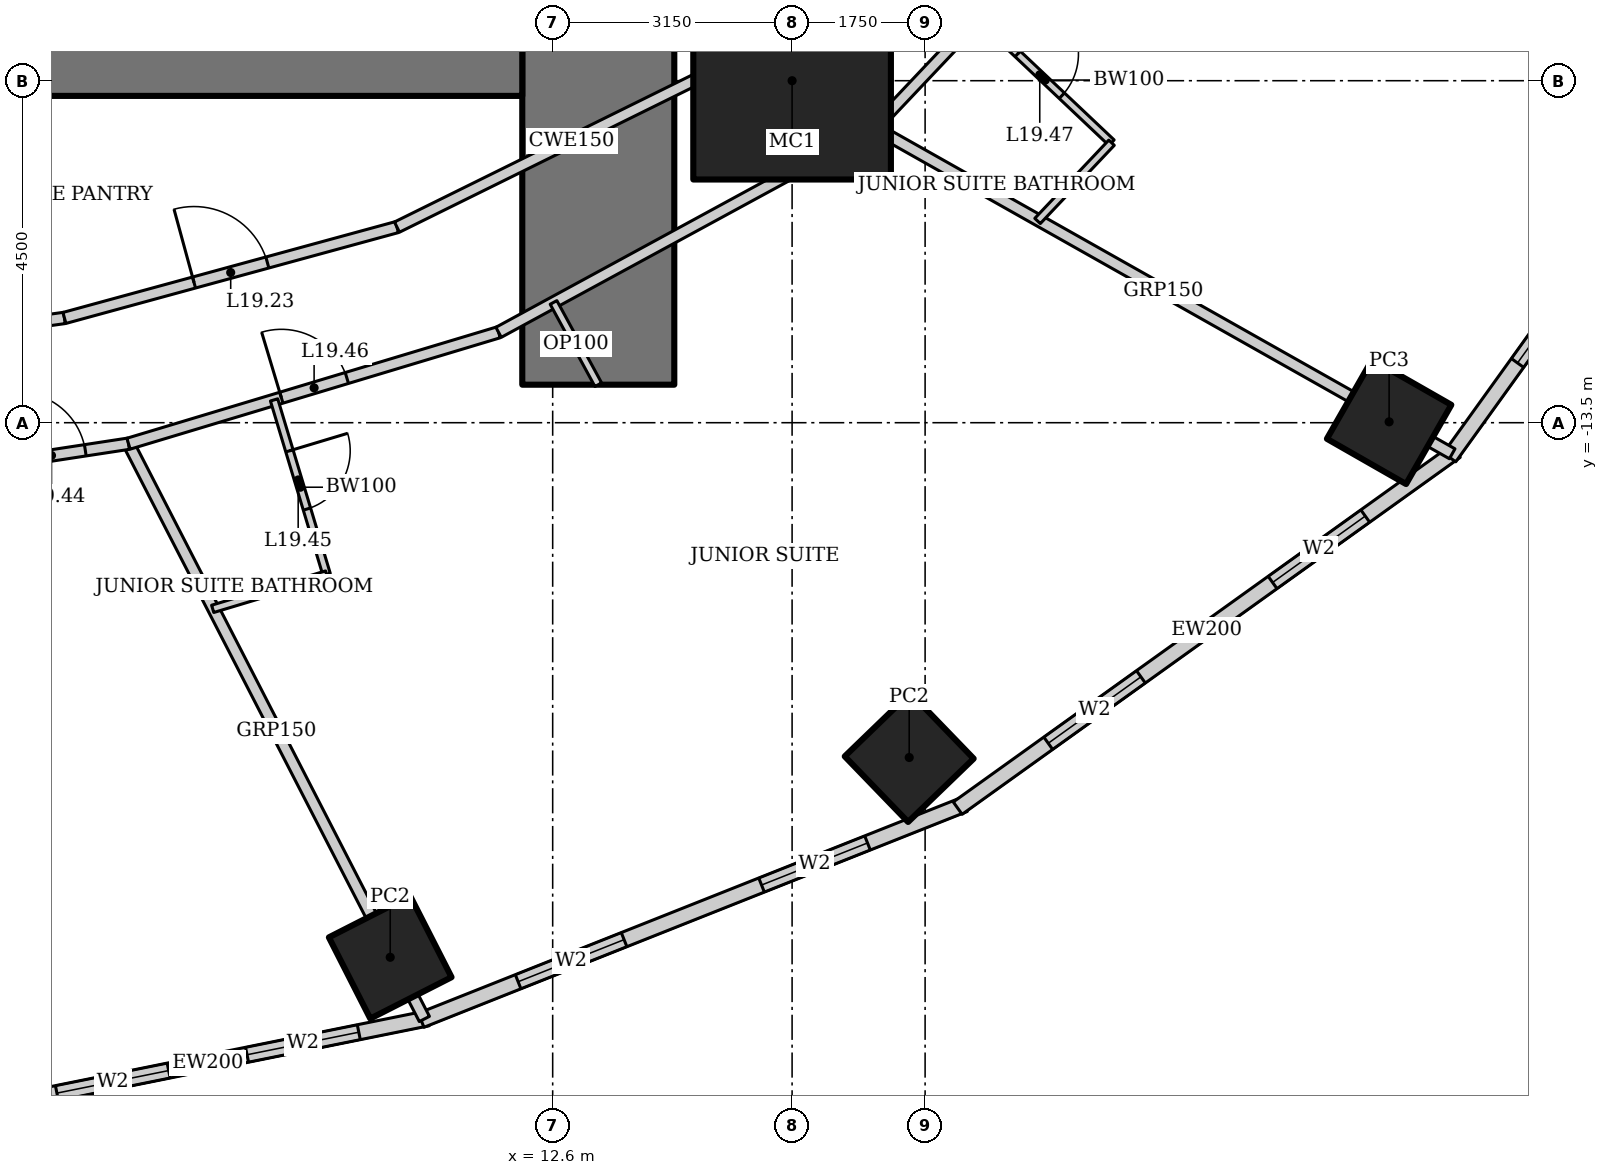
"""IFC4 building model, lengths in metres.
Left out: names, types, materials, properties, quantities, classifications, styles, units other than length and angle.
Written with IfcOpenShell. Run it as: python <this file> out.ifc"""

import sys

from ifc_helpers import new_model, si_unit, direction, frame, frame_2d, origin, origin_2d, place, context, subcontext, project, spatial, rectangle, hollow_rectangle, extrude, element, fill, save


model = new_model("IFC4")
c1 = context("Model", 3, precision=1e-05, world=origin(), true_north=direction((0.0, 1.0)))
c2 = subcontext(c1, "Body", "Model", "MODEL_VIEW")
j1 = project(units=[si_unit("LENGTHUNIT", "METRE"), si_unit("PLANEANGLEUNIT", "RADIAN")], contexts=[c1])
p1 = place(None, origin())
s1 = spatial("IfcSite", under=j1, at=p1, CompositionType="ELEMENT")
p2 = place(p1, origin())
s2 = spatial("IfcBuilding", under=s1, at=p2, CompositionType="ELEMENT")
p3 = place(p2, frame((0.0, 0.0, 83.8)))
s3 = spatial("IfcBuildingStorey", under=s2, at=p3, CompositionType="ELEMENT", Elevation=83.8)
p4 = place(p3, frame((15.75, -9.0, 0.0), z_axis=(0.0, 0.0, 1.0), x_axis=(1.0, 0.0, 0.0)))
e1 = element("IfcColumn", 1, at=p4, inside=s3, PredefinedType="COLUMN", context=c2, shape_type="SweptSolid", body=[
    extrude(hollow_rectangle(XDim=2.6, YDim=2.6, WallThickness=0.13, at=origin_2d()), origin(), (0.0, 0.0, 1.0), 3.6),
])
for number, where, z_axis, x_axis in (
    (2, (10.463, -20.534, 0.0), (0.0, 0.0, 1.0), (0.891, 0.454, 0.0)),
    (3, (17.291, -17.905, 0.0), (0.0, 0.0, 1.0), (0.719, 0.695, 0.0)),
):
    element("IfcColumn", number, at=place(p3, frame(where, z_axis=z_axis, x_axis=x_axis)), inside=s3, PredefinedType="COLUMN", context=c2, shape_type="SweptSolid", body=[
        extrude(hollow_rectangle(XDim=1.2, YDim=1.2, WallThickness=0.1, at=origin_2d()), origin(), (0.0, 0.0, 1.0), 3.6),
    ])
p5 = place(p3, frame((23.605, -13.489, 0.0), z_axis=(0.0, 0.0, 1.0), x_axis=(0.496139221777, 0.86824298017, 0.0)))
e4 = element("IfcColumn", 4, at=p5, inside=s3, PredefinedType="COLUMN", context=c2, shape_type="SweptSolid", body=[
    extrude(hollow_rectangle(XDim=1.2, YDim=1.2, WallThickness=0.12, at=origin_2d()), origin(), (0.0, 0.0, 1.0), 3.6),
])
p6 = place(p3, frame((13.2, -13.0, 0.0), z_axis=(0.0, 0.0, 1.0), x_axis=(0.0, 1.0, 0.0)))
e5 = element("IfcWall", 5, at=p6, inside=s3, PredefinedType="SHEAR", context=c2, shape_type="SweptSolid", body=[
    extrude(rectangle(XDim=26.0, YDim=2.0, at=frame_2d((13.0, 0.0))), origin(), (0.0, 0.0, 1.0), 3.6),
])
p7 = place(p6, frame((12.1, 0.0, 0.0)))
e6 = element("IfcOpeningElement", 6, at=p7, cuts=e5, PredefinedType="OPENING", context=c2, shape_type="SweptSolid", body=[
    extrude(rectangle(XDim=1.8, YDim=2.1, at=frame_2d((0.9, 1.05))), frame((0.0, 1.01, 0.0), z_axis=(0.0, -1.0, 0.0), x_axis=(1.0, 0.0, 0.0)), (0.0, 0.0, 1.0), 2.02),
])
p8 = place(p3, frame((-12.2, -8.0, 0.0), z_axis=(0.0, 0.0, 1.0), x_axis=(1.0, 0.0, 0.0)))
e7 = element("IfcWall", 7, at=p8, inside=s3, PredefinedType="SHEAR", context=c2, shape_type="SweptSolid", body=[
    extrude(rectangle(XDim=24.4, YDim=2.4, at=frame_2d((12.2, 0.0))), origin(), (0.0, 0.0, 1.0), 3.6),
])
p9 = place(p3, frame((5.17, -22.504, 0.0), z_axis=(0.0, 0.0, 1.0), x_axis=(0.980251657452, 0.197754110105, 0.0)))
e8 = element("IfcWall", 8, at=p9, inside=s3, PredefinedType="SOLIDWALL", context=c2, shape_type="SweptSolid", body=[
    extrude(rectangle(XDim=5.904, YDim=0.2, at=frame_2d((2.952, 0.0))), origin(), (0.0, 0.0, 1.0), 3.45),
])
p10 = place(p9, frame((0.926, 0.0, 0.5)))
e9 = element("IfcOpeningElement", 9, at=p10, cuts=e8, PredefinedType="OPENING", context=c2, shape_type="SweptSolid", body=[
    extrude(rectangle(XDim=1.5, YDim=2.2, at=frame_2d((0.75, 1.1))), frame((0.0, 0.11, 0.0), z_axis=(0.0, -1.0, 0.0), x_axis=(1.0, 0.0, 0.0)), (0.0, 0.0, 1.0), 0.22),
])
p11 = place(p9, frame((3.478, 0.0, 0.5)))
e10 = element("IfcOpeningElement", 10, at=p11, cuts=e8, PredefinedType="OPENING", context=c2, shape_type="SweptSolid", body=[
    extrude(rectangle(XDim=1.5, YDim=2.2, at=frame_2d((0.75, 1.1))), frame((0.0, 0.11, 0.0), z_axis=(0.0, -1.0, 0.0), x_axis=(1.0, 0.0, 0.0)), (0.0, 0.0, 1.0), 0.22),
])
p12 = place(p3, frame((10.869, -21.363, 0.0), z_axis=(0.0, 0.0, 1.0), x_axis=(0.929358351251, 0.369178892895, 0.0)))
e11 = element("IfcWall", 11, at=p12, inside=s3, PredefinedType="SOLIDWALL", context=c2, shape_type="SweptSolid", body=[
    extrude(rectangle(XDim=7.692, YDim=0.2, at=frame_2d((3.846, 0.0))), origin(), (0.0, 0.0, 1.0), 3.45),
])
p13 = place(p12, frame((1.373, 0.0, 0.5)))
e12 = element("IfcOpeningElement", 12, at=p13, cuts=e11, PredefinedType="OPENING", context=c2, shape_type="SweptSolid", body=[
    extrude(rectangle(XDim=1.5, YDim=2.2, at=frame_2d((0.75, 1.1))), frame((0.0, 0.11, 0.0), z_axis=(0.0, -1.0, 0.0), x_axis=(1.0, 0.0, 0.0)), (0.0, 0.0, 1.0), 0.22),
])
p14 = place(p12, frame((4.819, 0.0, 0.5)))
e13 = element("IfcOpeningElement", 13, at=p14, cuts=e11, PredefinedType="OPENING", context=c2, shape_type="SweptSolid", body=[
    extrude(rectangle(XDim=1.5, YDim=2.2, at=frame_2d((0.75, 1.1))), frame((0.0, 0.11, 0.0), z_axis=(0.0, -1.0, 0.0), x_axis=(1.0, 0.0, 0.0)), (0.0, 0.0, 1.0), 0.22),
])
p15 = place(p3, frame((17.929, -18.572, 0.0), z_axis=(0.0, 0.0, 1.0), x_axis=(0.812791321576, 0.582554948112, 0.0)))
e14 = element("IfcWall", 14, at=p15, inside=s3, PredefinedType="SOLIDWALL", context=c2, shape_type="SweptSolid", body=[
    extrude(rectangle(XDim=8.063, YDim=0.2, at=frame_2d((4.032, 0.0))), origin(), (0.0, 0.0, 1.0), 3.45),
])
p16 = place(p15, frame((1.466, 0.0, 0.5)))
e15 = element("IfcOpeningElement", 15, at=p16, cuts=e14, PredefinedType="OPENING", context=c2, shape_type="SweptSolid", body=[
    extrude(rectangle(XDim=1.5, YDim=2.2, at=frame_2d((0.75, 1.1))), frame((0.0, 0.11, 0.0), z_axis=(0.0, -1.0, 0.0), x_axis=(1.0, 0.0, 0.0)), (0.0, 0.0, 1.0), 0.22),
])
p17 = place(p15, frame((5.097, 0.0, 0.5)))
e16 = element("IfcOpeningElement", 16, at=p17, cuts=e14, PredefinedType="OPENING", context=c2, shape_type="SweptSolid", body=[
    extrude(rectangle(XDim=1.5, YDim=2.2, at=frame_2d((0.75, 1.1))), frame((0.0, 0.11, 0.0), z_axis=(0.0, -1.0, 0.0), x_axis=(1.0, 0.0, 0.0)), (0.0, 0.0, 1.0), 0.22),
])
p18 = place(p3, frame((24.4, -13.957, 0.0), z_axis=(0.0, 0.0, 1.0), x_axis=(0.583937613703, 0.811798536155, 0.0)))
e17 = element("IfcWall", 17, at=p18, inside=s3, PredefinedType="SOLIDWALL", context=c2, shape_type="SweptSolid", body=[
    extrude(rectangle(XDim=8.323, YDim=0.2, at=frame_2d((4.162, 0.0))), origin(), (0.0, 0.0, 1.0), 3.45),
])
p19 = place(p18, frame((1.531, 0.0, 0.5)))
e18 = element("IfcOpeningElement", 18, at=p19, cuts=e17, PredefinedType="OPENING", context=c2, shape_type="SweptSolid", body=[
    extrude(rectangle(XDim=1.5, YDim=2.2, at=frame_2d((0.75, 1.1))), frame((0.0, 0.11, 0.0), z_axis=(0.0, -1.0, 0.0), x_axis=(1.0, 0.0, 0.0)), (0.0, 0.0, 1.0), 0.22),
])
p20 = place(p18, frame((5.292, 0.0, 0.5)))
e19 = element("IfcOpeningElement", 19, at=p20, cuts=e17, PredefinedType="OPENING", context=c2, shape_type="SweptSolid", body=[
    extrude(rectangle(XDim=1.5, YDim=2.2, at=frame_2d((0.75, 1.1))), frame((0.0, 0.11, 0.0), z_axis=(0.0, -1.0, 0.0), x_axis=(1.0, 0.0, 0.0)), (0.0, 0.0, 1.0), 0.22),
])
p21 = place(p3, frame((10.912, -21.346, 0.0), z_axis=(0.0, 0.0, 1.0), x_axis=(-0.457327273085, 0.889298468059, 0.0)))
e20 = element("IfcWall", 20, at=p21, inside=s3, PredefinedType="PARTITIONING", context=c2, shape_type="SweptSolid", body=[
    extrude(rectangle(XDim=8.511, YDim=0.15, at=frame_2d((4.256, 0.0))), origin(), (0.0, 0.0, 1.0), 2.528),
])
p22 = place(p3, frame((24.435, -13.909, 0.0), z_axis=(0.0, 0.0, 1.0), x_axis=(-0.87090601027, 0.491449612143, 0.0)))
e21 = element("IfcWall", 21, at=p22, inside=s3, PredefinedType="PARTITIONING", context=c2, shape_type="SweptSolid", body=[
    extrude(rectangle(XDim=8.726, YDim=0.15, at=frame_2d((4.363, 0.0))), origin(), (0.0, 0.0, 1.0), 2.693),
])
p23 = place(p3, frame((3.311, -14.342, 0.0), z_axis=(0.0, 0.0, 1.0), x_axis=(0.988564270062, 0.150800145746, 0.0)))
e22 = element("IfcWall", 22, at=p23, inside=s3, PredefinedType="PARTITIONING", context=c2, shape_type="SweptSolid", body=[
    extrude(rectangle(XDim=3.751, YDim=0.15, at=frame_2d((1.875, 0.0))), origin(), (0.0, 0.0, 1.0), 3.45),
])
p24 = place(p23, frame((2.276, 0.0, 0.0)))
e23 = element("IfcOpeningElement", 23, at=p24, cuts=e22, PredefinedType="OPENING", context=c2, shape_type="SweptSolid", body=[
    extrude(rectangle(XDim=0.9, YDim=2.1, at=frame_2d((0.45, 1.05))), frame((0.0, 0.085, 0.0), z_axis=(0.0, -1.0, 0.0), x_axis=(1.0, 0.0, 0.0)), (0.0, 0.0, 1.0), 0.17),
])
p25 = place(p3, frame((7.019, -13.776, 0.0), z_axis=(0.0, 0.0, 1.0), x_axis=(0.957564241242, 0.288219922793, 0.0)))
e24 = element("IfcWall", 24, at=p25, inside=s3, PredefinedType="PARTITIONING", context=c2, shape_type="SweptSolid", body=[
    extrude(rectangle(XDim=5.085, YDim=0.15, at=frame_2d((2.542, 0.0))), origin(), (0.0, 0.0, 1.0), 3.45),
])
p26 = place(p25, frame((2.1, 0.0, 0.0)))
e25 = element("IfcOpeningElement", 25, at=p26, cuts=e24, PredefinedType="OPENING", context=c2, shape_type="SweptSolid", body=[
    extrude(rectangle(XDim=0.9, YDim=2.1, at=frame_2d((0.45, 1.05))), frame((0.0, 0.085, 0.0), z_axis=(0.0, -1.0, 0.0), x_axis=(1.0, 0.0, 0.0)), (0.0, 0.0, 1.0), 0.17),
])
p27 = place(p3, frame((11.888, -12.311, 0.0), z_axis=(0.0, 0.0, 1.0), x_axis=(0.878450059298, 0.477834169267, 0.0)))
e26 = element("IfcWall", 26, at=p27, inside=s3, PredefinedType="PARTITIONING", context=c2, shape_type="SweptSolid", body=[
    extrude(rectangle(XDim=5.631, YDim=0.15, at=frame_2d((2.815, 0.0))), origin(), (0.0, 0.0, 1.0), 3.45),
])
p28 = place(p3, frame((16.835, -9.62, 0.0), z_axis=(0.0, 0.0, 1.0), x_axis=(0.687062608696, 0.726598218916, 0.0)))
e27 = element("IfcWall", 27, at=p28, inside=s3, PredefinedType="PARTITIONING", context=c2, shape_type="SweptSolid", body=[
    extrude(rectangle(XDim=6.039, YDim=0.15, at=frame_2d((3.02, 0.0))), origin(), (0.0, 0.0, 1.0), 3.45),
])
p29 = place(p3, frame((2.903, -12.574, 0.0), z_axis=(0.0, 0.0, 1.0), x_axis=(0.990563451353, 0.137054911782, 0.0)))
e28 = element("IfcWall", 28, at=p29, inside=s3, PredefinedType="PARTITIONING", context=c2, shape_type="SweptSolid", body=[
    extrude(rectangle(XDim=3.304, YDim=0.15, at=frame_2d((1.652, 0.0))), origin(), (0.0, 0.0, 1.0), 3.45),
])
p30 = place(p3, frame((6.176, -12.122, 0.0), z_axis=(0.0, 0.0, 1.0), x_axis=(0.964644466646, 0.263554648923, 0.0)))
e29 = element("IfcWall", 29, at=p30, inside=s3, PredefinedType="PARTITIONING", context=c2, shape_type="SweptSolid", body=[
    extrude(rectangle(XDim=4.535, YDim=0.15, at=frame_2d((2.268, 0.0))), origin(), (0.0, 0.0, 1.0), 3.45),
])
p31 = place(p30, frame((1.768, 0.0, 0.0)))
e30 = element("IfcOpeningElement", 30, at=p31, cuts=e29, PredefinedType="OPENING", context=c2, shape_type="SweptSolid", body=[
    extrude(rectangle(XDim=1.0, YDim=2.1, at=frame_2d((0.5, 1.05))), frame((0.0, 0.085, 0.0), z_axis=(0.0, -1.0, 0.0), x_axis=(1.0, 0.0, 0.0)), (0.0, 0.0, 1.0), 0.17),
])
p32 = place(p3, frame((10.551, -10.926, 0.0), z_axis=(0.0, 0.0, 1.0), x_axis=(0.89656943448, 0.442903205177, 0.0)))
e31 = element("IfcWall", 31, at=p32, inside=s3, PredefinedType="PARTITIONING", context=c2, shape_type="SweptSolid", body=[
    extrude(rectangle(XDim=5.126, YDim=0.15, at=frame_2d((2.563, 0.0))), origin(), (0.0, 0.0, 1.0), 3.45),
])
p33 = place(p3, frame((15.147, -8.656, 0.0), z_axis=(0.0, 0.0, 1.0), x_axis=(0.720837261072, 0.693104352209, 0.0)))
e32 = element("IfcWall", 32, at=p33, inside=s3, PredefinedType="PARTITIONING", context=c2, shape_type="SweptSolid", body=[
    extrude(rectangle(XDim=5.59, YDim=0.15, at=frame_2d((2.795, 0.0))), origin(), (0.0, 0.0, 1.0), 3.45),
])
p34 = place(p33, frame((2.295, 0.0, 0.0)))
e33 = element("IfcOpeningElement", 33, at=p34, cuts=e32, PredefinedType="OPENING", context=c2, shape_type="SweptSolid", body=[
    extrude(rectangle(XDim=1.0, YDim=2.1, at=frame_2d((0.5, 1.05))), frame((0.0, 0.085, 0.0), z_axis=(0.0, -1.0, 0.0), x_axis=(1.0, 0.0, 0.0)), (0.0, 0.0, 1.0), 0.17),
])
p35 = place(p3, frame((8.935, -13.2, 0.0), z_axis=(0.0, 0.0, 1.0), x_axis=(0.288197066254, -0.957571120598, 0.0)))
e34 = element("IfcWall", 34, at=p35, inside=s3, PredefinedType="PARTITIONING", context=c2, shape_type="SweptSolid", body=[
    extrude(rectangle(XDim=2.4, YDim=0.1, at=frame_2d((1.2, 0.0))), origin(), (0.0, 0.0, 1.0), 3.45),
])
p36 = place(p35, frame((0.7, 0.0, 0.0)))
e35 = element("IfcOpeningElement", 35, at=p36, cuts=e34, PredefinedType="OPENING", context=c2, shape_type="SweptSolid", body=[
    extrude(rectangle(XDim=0.8, YDim=2.1, at=frame_2d((0.4, 1.05))), frame((0.0, 0.06, 0.0), z_axis=(0.0, -1.0, 0.0), x_axis=(1.0, 0.0, 0.0)), (0.0, 0.0, 1.0), 0.12),
])
p37 = place(p3, frame((9.626, -15.498, 0.0), z_axis=(0.0, 0.0, 1.0), x_axis=(-0.957551231109, -0.288263143328, 0.0)))
e36 = element("IfcWall", 36, at=p37, inside=s3, PredefinedType="PARTITIONING", context=c2, shape_type="SweptSolid", body=[
    extrude(rectangle(XDim=1.566, YDim=0.1, at=frame_2d((0.783, 0.0))), origin(), (0.0, 0.0, 1.0), 3.45),
])
p38 = place(p3, frame((18.209, -8.167, 0.0), z_axis=(0.0, 0.0, 1.0), x_axis=(0.726567238928, -0.687095369885, 0.0)))
e37 = element("IfcWall", 37, at=p38, inside=s3, PredefinedType="PARTITIONING", context=c2, shape_type="SweptSolid", body=[
    extrude(rectangle(XDim=2.4, YDim=0.1, at=frame_2d((1.2, 0.0))), origin(), (0.0, 0.0, 1.0), 3.45),
])
p39 = place(p38, frame((0.7, 0.0, 0.0)))
e38 = element("IfcOpeningElement", 38, at=p39, cuts=e37, PredefinedType="OPENING", context=c2, shape_type="SweptSolid", body=[
    extrude(rectangle(XDim=0.8, YDim=2.1, at=frame_2d((0.4, 1.05))), frame((0.0, 0.06, 0.0), z_axis=(0.0, -1.0, 0.0), x_axis=(1.0, 0.0, 0.0)), (0.0, 0.0, 1.0), 0.12),
])
p40 = place(p3, frame((19.953, -9.816, 0.0), z_axis=(0.0, 0.0, 1.0), x_axis=(-0.687017997787, -0.726640399866, 0.0)))
e39 = element("IfcWall", 39, at=p40, inside=s3, PredefinedType="PARTITIONING", context=c2, shape_type="SweptSolid", body=[
    extrude(rectangle(XDim=1.417, YDim=0.1, at=frame_2d((0.708, 0.0))), origin(), (0.0, 0.0, 1.0), 3.45),
])
p41 = place(p3, frame((13.2, -13.0, 0.0), z_axis=(0.0, 0.0, 1.0), x_axis=(-0.477852414256, 0.878440134665, 0.0)))
e40 = element("IfcWall", 40, at=p41, inside=s3, PredefinedType="PARTITIONING", context=c2, shape_type="SweptSolid", body=[
    extrude(rectangle(XDim=1.232, YDim=0.1, at=frame_2d((0.616, 0.0))), origin(), (0.0, 0.0, 1.0), 3.45),
])
p42 = place(p10, origin())
e41 = element("IfcWindow", 41, at=p42, inside=s3, PartitioningType="SINGLE_PANEL", PredefinedType="WINDOW", context=c2, shape_type="SweptSolid", body=[
    extrude(rectangle(XDim=1.5, YDim=2.2, at=frame_2d((0.75, 1.1))), frame((0.0, 0.03, 0.0), z_axis=(0.0, -1.0, 0.0), x_axis=(1.0, 0.0, 0.0)), (0.0, 0.0, 1.0), 0.06),
])
fill(e9, e41)
p43 = place(p11, origin())
e42 = element("IfcWindow", 42, at=p43, inside=s3, PartitioningType="SINGLE_PANEL", PredefinedType="WINDOW", context=c2, shape_type="SweptSolid", body=[
    extrude(rectangle(XDim=1.5, YDim=2.2, at=frame_2d((0.75, 1.1))), frame((0.0, 0.03, 0.0), z_axis=(0.0, -1.0, 0.0), x_axis=(1.0, 0.0, 0.0)), (0.0, 0.0, 1.0), 0.06),
])
fill(e10, e42)
p44 = place(p13, origin())
e43 = element("IfcWindow", 43, at=p44, inside=s3, PartitioningType="SINGLE_PANEL", PredefinedType="WINDOW", context=c2, shape_type="SweptSolid", body=[
    extrude(rectangle(XDim=1.5, YDim=2.2, at=frame_2d((0.75, 1.1))), frame((0.0, 0.03, 0.0), z_axis=(0.0, -1.0, 0.0), x_axis=(1.0, 0.0, 0.0)), (0.0, 0.0, 1.0), 0.06),
])
fill(e12, e43)
p45 = place(p14, origin())
e44 = element("IfcWindow", 44, at=p45, inside=s3, PartitioningType="SINGLE_PANEL", PredefinedType="WINDOW", context=c2, shape_type="SweptSolid", body=[
    extrude(rectangle(XDim=1.5, YDim=2.2, at=frame_2d((0.75, 1.1))), frame((0.0, 0.03, 0.0), z_axis=(0.0, -1.0, 0.0), x_axis=(1.0, 0.0, 0.0)), (0.0, 0.0, 1.0), 0.06),
])
fill(e13, e44)
p46 = place(p16, origin())
e45 = element("IfcWindow", 45, at=p46, inside=s3, PartitioningType="SINGLE_PANEL", PredefinedType="WINDOW", context=c2, shape_type="SweptSolid", body=[
    extrude(rectangle(XDim=1.5, YDim=2.2, at=frame_2d((0.75, 1.1))), frame((0.0, 0.03, 0.0), z_axis=(0.0, -1.0, 0.0), x_axis=(1.0, 0.0, 0.0)), (0.0, 0.0, 1.0), 0.06),
])
fill(e15, e45)
p47 = place(p17, origin())
e46 = element("IfcWindow", 46, at=p47, inside=s3, PartitioningType="SINGLE_PANEL", PredefinedType="WINDOW", context=c2, shape_type="SweptSolid", body=[
    extrude(rectangle(XDim=1.5, YDim=2.2, at=frame_2d((0.75, 1.1))), frame((0.0, 0.03, 0.0), z_axis=(0.0, -1.0, 0.0), x_axis=(1.0, 0.0, 0.0)), (0.0, 0.0, 1.0), 0.06),
])
fill(e16, e46)
p48 = place(p19, origin())
e47 = element("IfcWindow", 47, at=p48, inside=s3, PartitioningType="SINGLE_PANEL", PredefinedType="WINDOW", context=c2, shape_type="SweptSolid", body=[
    extrude(rectangle(XDim=1.5, YDim=2.2, at=frame_2d((0.75, 1.1))), frame((0.0, 0.03, 0.0), z_axis=(0.0, -1.0, 0.0), x_axis=(1.0, 0.0, 0.0)), (0.0, 0.0, 1.0), 0.06),
])
fill(e18, e47)
p49 = place(p31, origin())
e48 = element("IfcDoor", 48, at=p49, inside=s3, OperationType="SINGLE_SWING_LEFT", PredefinedType="DOOR", context=c2, shape_type="SweptSolid", body=[
    extrude(rectangle(XDim=1.0, YDim=2.1, at=frame_2d((0.5, 1.05))), frame((0.0, 0.025, 0.0), z_axis=(0.0, -1.0, 0.0), x_axis=(1.0, 0.0, 0.0)), (0.0, 0.0, 1.0), 0.05),
])
fill(e30, e48)
p50 = place(p24, origin())
e49 = element("IfcDoor", 49, at=p50, inside=s3, OperationType="SINGLE_SWING_LEFT", PredefinedType="DOOR", context=c2, shape_type="SweptSolid", body=[
    extrude(rectangle(XDim=0.9, YDim=2.1, at=frame_2d((0.45, 1.05))), frame((0.0, 0.025, 0.0), z_axis=(0.0, -1.0, 0.0), x_axis=(1.0, 0.0, 0.0)), (0.0, 0.0, 1.0), 0.05),
])
fill(e23, e49)
p51 = place(p36, origin())
e50 = element("IfcDoor", 50, at=p51, inside=s3, OperationType="SINGLE_SWING_LEFT", PredefinedType="DOOR", context=c2, shape_type="SweptSolid", body=[
    extrude(rectangle(XDim=0.8, YDim=2.1, at=frame_2d((0.4, 1.05))), frame((0.0, 0.025, 0.0), z_axis=(0.0, -1.0, 0.0), x_axis=(1.0, 0.0, 0.0)), (0.0, 0.0, 1.0), 0.05),
])
fill(e35, e50)
p52 = place(p26, origin())
e51 = element("IfcDoor", 51, at=p52, inside=s3, OperationType="SINGLE_SWING_LEFT", PredefinedType="DOOR", context=c2, shape_type="SweptSolid", body=[
    extrude(rectangle(XDim=0.9, YDim=2.1, at=frame_2d((0.45, 1.05))), frame((0.0, 0.025, 0.0), z_axis=(0.0, -1.0, 0.0), x_axis=(1.0, 0.0, 0.0)), (0.0, 0.0, 1.0), 0.05),
])
fill(e25, e51)
p53 = place(p39, origin())
e52 = element("IfcDoor", 52, at=p53, inside=s3, OperationType="SINGLE_SWING_LEFT", PredefinedType="DOOR", context=c2, shape_type="SweptSolid", body=[
    extrude(rectangle(XDim=0.8, YDim=2.1, at=frame_2d((0.4, 1.05))), frame((0.0, 0.025, 0.0), z_axis=(0.0, -1.0, 0.0), x_axis=(1.0, 0.0, 0.0)), (0.0, 0.0, 1.0), 0.05),
])
fill(e38, e52)
save(model, sys.argv[1])
